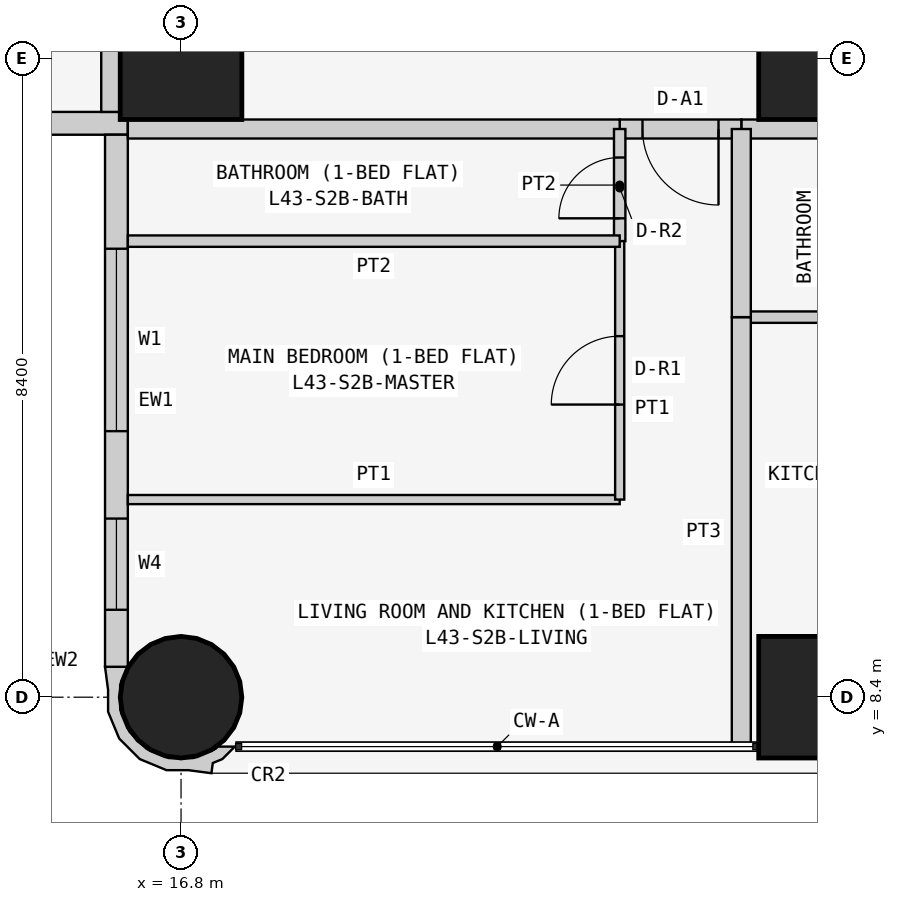
"""IFC4 building model, lengths in metres.
Left out: names, types, materials, properties, quantities, classifications, styles, units other than length and angle.
Written with IfcOpenShell. Run it as: python <this file> out.ifc"""

import sys

from ifc_helpers import new_model, si_unit, direction, frame, frame_2d, origin, origin_2d, place, context, subcontext, project, spatial, polyline, rectangle, circle, outline, extrude, element, fill, save


model = new_model("IFC4")
c1 = context("Model", 3, precision=1e-05, world=origin(), true_north=direction((0.0, 1.0)))
c2 = subcontext(c1, "Body", "Model", "MODEL_VIEW")
j1 = project(units=[si_unit("LENGTHUNIT", "METRE"), si_unit("PLANEANGLEUNIT", "RADIAN")], contexts=[c1])
p1 = place(None, origin())
s1 = spatial("IfcSite", under=j1, at=p1, CompositionType="ELEMENT")
p2 = place(p1, origin())
s2 = spatial("IfcBuilding", under=s1, at=p2, CompositionType="ELEMENT")
p3 = place(p2, frame((0.0, 0.0, 166.5)))
s3 = spatial("IfcBuildingStorey", under=s2, at=p3, CompositionType="ELEMENT", Elevation=166.5)
p4 = place(p3, frame((16.8, 8.4, 0.0), z_axis=(0.0, 0.0, 1.0), x_axis=(1.0, 0.0, 0.0)))
e1 = element("IfcColumn", 1, at=p4, inside=s3, PredefinedType="COLUMN", context=c2, shape_type="SweptSolid", body=[
    extrude(circle(Radius=0.8, at=origin_2d()), origin(), (0.0, 0.0, 1.0), 3.6),
])
for number, where, z_axis, x_axis in (
    (2, (16.8, 16.8, 0.0), (0.0, 0.0, 1.0), (1.0, 0.0, 0.0)),
    (3, (25.2, 8.4, 0.0), (0.0, 0.0, 1.0), (1.0, 0.0, 0.0)),
    (4, (25.2, 16.8, 0.0), (0.0, 0.0, 1.0), (1.0, 0.0, 0.0)),
):
    element("IfcColumn", number, at=place(p3, frame(where, z_axis=z_axis, x_axis=x_axis)), inside=s3, PredefinedType="COLUMN", context=c2, shape_type="SweptSolid", body=[
        extrude(rectangle(XDim=1.6, YDim=1.6, at=origin_2d()), origin(), (0.0, 0.0, 1.0), 3.6),
    ])
p5 = place(p3, frame((0.4, 15.95, 0.0), z_axis=(0.0, 0.0, 1.0), x_axis=(1.0, 0.0, 0.0)))
e5 = element("IfcWall", 5, at=p5, inside=s3, PredefinedType="SOLIDWALL", context=c2, shape_type="SweptSolid", body=[
    extrude(rectangle(XDim=15.7, YDim=0.3, at=frame_2d((7.85, 0.0))), origin(), (0.0, 0.0, 1.0), 3.45),
])
p6 = place(p5, frame((12.4, 0.0, 0.9)))
e6 = element("IfcOpeningElement", 6, at=p6, cuts=e5, PredefinedType="OPENING", context=c2, shape_type="SweptSolid", body=[
    extrude(rectangle(XDim=1.8, YDim=1.5, at=frame_2d((0.9, 0.75))), frame((0.0, 0.16, 0.0), z_axis=(0.0, -1.0, 0.0), x_axis=(1.0, 0.0, 0.0)), (0.0, 0.0, 1.0), 0.32),
])
p7 = place(p5, frame((9.55, 0.0, 1.5)))
e7 = element("IfcOpeningElement", 7, at=p7, cuts=e5, PredefinedType="OPENING", context=c2, shape_type="SweptSolid", body=[
    extrude(rectangle(XDim=0.9, YDim=0.7, at=frame_2d((0.45, 0.35))), frame((0.0, 0.16, 0.0), z_axis=(0.0, -1.0, 0.0), x_axis=(1.0, 0.0, 0.0)), (0.0, 0.0, 1.0), 0.32),
])
p8 = place(p5, frame((5.1, 0.0, 0.9)))
e8 = element("IfcOpeningElement", 8, at=p8, cuts=e5, PredefinedType="OPENING", context=c2, shape_type="SweptSolid", body=[
    extrude(rectangle(XDim=1.8, YDim=1.5, at=frame_2d((0.9, 0.75))), frame((0.0, 0.16, 0.0), z_axis=(0.0, -1.0, 0.0), x_axis=(1.0, 0.0, 0.0)), (0.0, 0.0, 1.0), 0.32),
])
p9 = place(p5, frame((2.0, 0.0, 0.0)))
e9 = element("IfcOpeningElement", 9, at=p9, cuts=e5, PredefinedType="OPENING", context=c2, shape_type="SweptSolid", body=[
    extrude(rectangle(XDim=0.9, YDim=2.4, at=frame_2d((0.45, 1.2))), frame((0.0, 0.16, 0.0), z_axis=(0.0, -1.0, 0.0), x_axis=(1.0, 0.0, 0.0)), (0.0, 0.0, 1.0), 0.32),
])
p10 = place(p5, frame((0.7, 0.0, 0.9)))
e10 = element("IfcOpeningElement", 10, at=p10, cuts=e5, PredefinedType="OPENING", context=c2, shape_type="SweptSolid", body=[
    extrude(rectangle(XDim=1.2, YDim=1.5, at=frame_2d((0.6, 0.75))), frame((0.0, 0.16, 0.0), z_axis=(0.0, -1.0, 0.0), x_axis=(1.0, 0.0, 0.0)), (0.0, 0.0, 1.0), 0.32),
])
p11 = place(p3, frame((15.95, 15.8, 0.0), z_axis=(0.0, 0.0, 1.0), x_axis=(0.0, -1.0, 0.0)))
e11 = element("IfcWall", 11, at=p11, inside=s3, PredefinedType="SOLIDWALL", context=c2, shape_type="SweptSolid", body=[
    extrude(rectangle(XDim=7.0, YDim=0.3, at=frame_2d((3.5, 0.0))), origin(), (0.0, 0.0, 1.0), 3.45),
])
p12 = place(p11, frame((1.5, 0.0, 0.9)))
e12 = element("IfcOpeningElement", 12, at=p12, cuts=e11, PredefinedType="OPENING", context=c2, shape_type="SweptSolid", body=[
    extrude(rectangle(XDim=2.4, YDim=1.5, at=frame_2d((1.2, 0.75))), frame((0.0, 0.16, 0.0), z_axis=(0.0, -1.0, 0.0), x_axis=(1.0, 0.0, 0.0)), (0.0, 0.0, 1.0), 0.32),
])
p13 = place(p11, frame((5.05, 0.0, 0.9)))
e13 = element("IfcOpeningElement", 13, at=p13, cuts=e11, PredefinedType="OPENING", context=c2, shape_type="SweptSolid", body=[
    extrude(rectangle(XDim=1.2, YDim=1.5, at=frame_2d((0.6, 0.75))), frame((0.0, 0.16, 0.0), z_axis=(0.0, -1.0, 0.0), x_axis=(1.0, 0.0, 0.0)), (0.0, 0.0, 1.0), 0.32),
])
p14 = place(p3, frame((15.983, 8.727, 0.0), z_axis=(0.0, 0.0, 1.0), x_axis=(-0.343276641956, -0.93923434088, 0.0)))
e14 = element("IfcWall", 14, at=p14, inside=s3, PredefinedType="SOLIDWALL", context=c2, shape_type="SweptSolid", body=[
    extrude(outline(polyline([(0.829, 1.599), (0.697, 1.569), (0.604, 1.67), (0.394, 1.767), (0.471, 1.556), (0.509, 1.539), (0.724, 1.304), (0.833, 1.005), (0.82, 0.686), (0.686, 0.397), (0.451, 0.182), (0.152, 0.073), (-0.116, 0.084), (-0.127, 0.078), (-0.146, 0.071), (-0.006, -0.197), (0.266, -0.055), (0.535, 0.044), (0.817, 0.302), (0.978, 0.648), (0.994, 1.03), (0.895, 1.3), (0.829, 1.599)])), origin(), (0.0, 0.0, 1.0), 3.45),
])
p15 = place(p3, frame((26.8, 15.875, 0.0), z_axis=(0.0, 0.0, 1.0), x_axis=(-1.0, 0.0, 0.0)))
e15 = element("IfcWall", 15, at=p15, inside=s3, PredefinedType="PARTITIONING", context=c2, shape_type="SweptSolid", body=[
    extrude(rectangle(XDim=2.629, YDim=0.25, at=frame_2d((1.314, 0.0))), origin(), (0.0, 0.0, 1.0), 3.45),
])
p16 = place(p3, frame((24.171, 15.875, 0.0), z_axis=(0.0, 0.0, 1.0), x_axis=(-1.0, 0.0, 0.0)))
e16 = element("IfcWall", 16, at=p16, inside=s3, PredefinedType="PARTITIONING", context=c2, shape_type="SweptSolid", body=[
    extrude(rectangle(XDim=1.6, YDim=0.25, at=frame_2d((0.8, 0.0))), origin(), (0.0, 0.0, 1.0), 3.45),
])
p17 = place(p16, frame((0.3, 0.0, 0.0)))
e17 = element("IfcOpeningElement", 17, at=p17, cuts=e16, PredefinedType="OPENING", context=c2, shape_type="SweptSolid", body=[
    extrude(rectangle(XDim=1.0, YDim=2.1, at=frame_2d((0.5, 1.05))), frame((0.0, 0.135, 0.0), z_axis=(0.0, -1.0, 0.0), x_axis=(1.0, 0.0, 0.0)), (0.0, 0.0, 1.0), 0.27),
])
p18 = place(p3, frame((22.571, 15.875, 0.0), z_axis=(0.0, 0.0, 1.0), x_axis=(-1.0, 0.0, 0.0)))
e18 = element("IfcWall", 18, at=p18, inside=s3, PredefinedType="PARTITIONING", context=c2, shape_type="SweptSolid", body=[
    extrude(rectangle(XDim=6.471, YDim=0.25, at=frame_2d((3.235, 0.0))), origin(), (0.0, 0.0, 1.0), 3.45),
])
p19 = place(p3, frame((15.875, 16.1, 0.0), z_axis=(0.0, 0.0, 1.0), x_axis=(0.0, 1.0, 0.0)))
e19 = element("IfcWall", 19, at=p19, inside=s3, PredefinedType="PARTITIONING", context=c2, shape_type="SweptSolid", body=[
    extrude(rectangle(XDim=6.871, YDim=0.25, at=frame_2d((3.436, 0.0))), origin(), (0.0, 0.0, 1.0), 3.45),
])
p20 = place(p3, frame((24.171, 13.4, 0.0), z_axis=(0.0, 0.0, 1.0), x_axis=(1.0, 0.0, 0.0)))
e20 = element("IfcWall", 20, at=p20, inside=s3, PredefinedType="PARTITIONING", context=c2, shape_type="SweptSolid", body=[
    extrude(rectangle(XDim=2.629, YDim=0.15, at=frame_2d((1.314, 0.0))), origin(), (0.0, 0.0, 1.0), 3.45),
])
p21 = place(p3, frame((24.171, 7.75, 0.0), z_axis=(0.0, 0.0, 1.0), x_axis=(0.0, 1.0, 0.0)))
e21 = element("IfcWall", 21, at=p21, inside=s3, PredefinedType="PARTITIONING", context=c2, shape_type="SweptSolid", body=[
    extrude(rectangle(XDim=5.65, YDim=0.25, at=frame_2d((2.825, 0.0))), origin(), (0.0, 0.0, 1.0), 3.45),
])
p22 = place(p3, frame((24.171, 13.4, 0.0), z_axis=(0.0, 0.0, 1.0), x_axis=(0.0, 1.0, 0.0)))
e22 = element("IfcWall", 22, at=p22, inside=s3, PredefinedType="PARTITIONING", context=c2, shape_type="SweptSolid", body=[
    extrude(rectangle(XDim=2.475, YDim=0.25, at=frame_2d((1.238, 0.0))), origin(), (0.0, 0.0, 1.0), 3.45),
])
p23 = place(p3, frame((22.571, 14.4, 0.0), z_axis=(0.0, 0.0, 1.0), x_axis=(0.0, 1.0, 0.0)))
e23 = element("IfcWall", 23, at=p23, inside=s3, PredefinedType="PARTITIONING", context=c2, shape_type="SweptSolid", body=[
    extrude(rectangle(XDim=1.475, YDim=0.15, at=frame_2d((0.738, 0.0))), origin(), (0.0, 0.0, 1.0), 3.45),
])
p24 = place(p23, frame((0.3, 0.0, 0.0)))
e24 = element("IfcOpeningElement", 24, at=p24, cuts=e23, PredefinedType="OPENING", context=c2, shape_type="SweptSolid", body=[
    extrude(rectangle(XDim=0.8, YDim=2.1, at=frame_2d((0.4, 1.05))), frame((0.0, 0.085, 0.0), z_axis=(0.0, -1.0, 0.0), x_axis=(1.0, 0.0, 0.0)), (0.0, 0.0, 1.0), 0.17),
])
p25 = place(p3, frame((16.1, 11.0, 0.0), z_axis=(0.0, 0.0, 1.0), x_axis=(1.0, 0.0, 0.0)))
e25 = element("IfcWall", 25, at=p25, inside=s3, PredefinedType="PARTITIONING", context=c2, shape_type="SweptSolid", body=[
    extrude(rectangle(XDim=6.471, YDim=0.12, at=frame_2d((3.235, 0.0))), origin(), (0.0, 0.0, 1.0), 3.45),
])
p26 = place(p3, frame((22.571, 11.0, 0.0), z_axis=(0.0, 0.0, 1.0), x_axis=(0.0, 1.0, 0.0)))
e26 = element("IfcWall", 26, at=p26, inside=s3, PredefinedType="PARTITIONING", context=c2, shape_type="SweptSolid", body=[
    extrude(rectangle(XDim=3.4, YDim=0.12, at=frame_2d((1.7, 0.0))), origin(), (0.0, 0.0, 1.0), 3.45),
])
p27 = place(p26, frame((1.25, 0.0, 0.0)))
e27 = element("IfcOpeningElement", 27, at=p27, cuts=e26, PredefinedType="OPENING", context=c2, shape_type="SweptSolid", body=[
    extrude(rectangle(XDim=0.9, YDim=2.1, at=frame_2d((0.45, 1.05))), frame((0.0, 0.07, 0.0), z_axis=(0.0, -1.0, 0.0), x_axis=(1.0, 0.0, 0.0)), (0.0, 0.0, 1.0), 0.14),
])
p28 = place(p3, frame((22.571, 14.4, 0.0), z_axis=(0.0, 0.0, 1.0), x_axis=(-1.0, 0.0, 0.0)))
e28 = element("IfcWall", 28, at=p28, inside=s3, PredefinedType="PARTITIONING", context=c2, shape_type="SweptSolid", body=[
    extrude(rectangle(XDim=6.471, YDim=0.15, at=frame_2d((3.235, 0.0))), origin(), (0.0, 0.0, 1.0), 3.45),
])
p29 = place(p12, origin())
e29 = element("IfcWindow", 29, at=p29, inside=s3, PartitioningType="SINGLE_PANEL", PredefinedType="WINDOW", context=c2, shape_type="SweptSolid", body=[
    extrude(rectangle(XDim=2.4, YDim=1.5, at=frame_2d((1.2, 0.75))), frame((0.0, 0.03, 0.0), z_axis=(0.0, -1.0, 0.0), x_axis=(1.0, 0.0, 0.0)), (0.0, 0.0, 1.0), 0.06),
])
fill(e12, e29)
p30 = place(p13, origin())
e30 = element("IfcWindow", 30, at=p30, inside=s3, PartitioningType="SINGLE_PANEL", PredefinedType="WINDOW", context=c2, shape_type="SweptSolid", body=[
    extrude(rectangle(XDim=1.2, YDim=1.5, at=frame_2d((0.6, 0.75))), frame((0.0, 0.03, 0.0), z_axis=(0.0, -1.0, 0.0), x_axis=(1.0, 0.0, 0.0)), (0.0, 0.0, 1.0), 0.06),
])
fill(e13, e30)
p31 = place(p17, origin())
e31 = element("IfcDoor", 31, at=p31, inside=s3, OperationType="SINGLE_SWING_LEFT", PredefinedType="DOOR", context=c2, shape_type="SweptSolid", body=[
    extrude(rectangle(XDim=1.0, YDim=2.1, at=frame_2d((0.5, 1.05))), frame((0.0, 0.025, 0.0), z_axis=(0.0, -1.0, 0.0), x_axis=(1.0, 0.0, 0.0)), (0.0, 0.0, 1.0), 0.05),
])
fill(e17, e31)
p32 = place(p24, origin())
e32 = element("IfcDoor", 32, at=p32, inside=s3, OperationType="SINGLE_SWING_LEFT", PredefinedType="DOOR", context=c2, shape_type="SweptSolid", body=[
    extrude(rectangle(XDim=0.8, YDim=2.1, at=frame_2d((0.4, 1.05))), frame((0.0, 0.025, 0.0), z_axis=(0.0, -1.0, 0.0), x_axis=(1.0, 0.0, 0.0)), (0.0, 0.0, 1.0), 0.05),
])
fill(e24, e32)
p33 = place(p27, origin())
e33 = element("IfcDoor", 33, at=p33, inside=s3, OperationType="SINGLE_SWING_LEFT", PredefinedType="DOOR", context=c2, shape_type="SweptSolid", body=[
    extrude(rectangle(XDim=0.9, YDim=2.1, at=frame_2d((0.45, 1.05))), frame((0.0, 0.025, 0.0), z_axis=(0.0, -1.0, 0.0), x_axis=(1.0, 0.0, 0.0)), (0.0, 0.0, 1.0), 0.05),
])
fill(e27, e33)
save(model, sys.argv[1])
